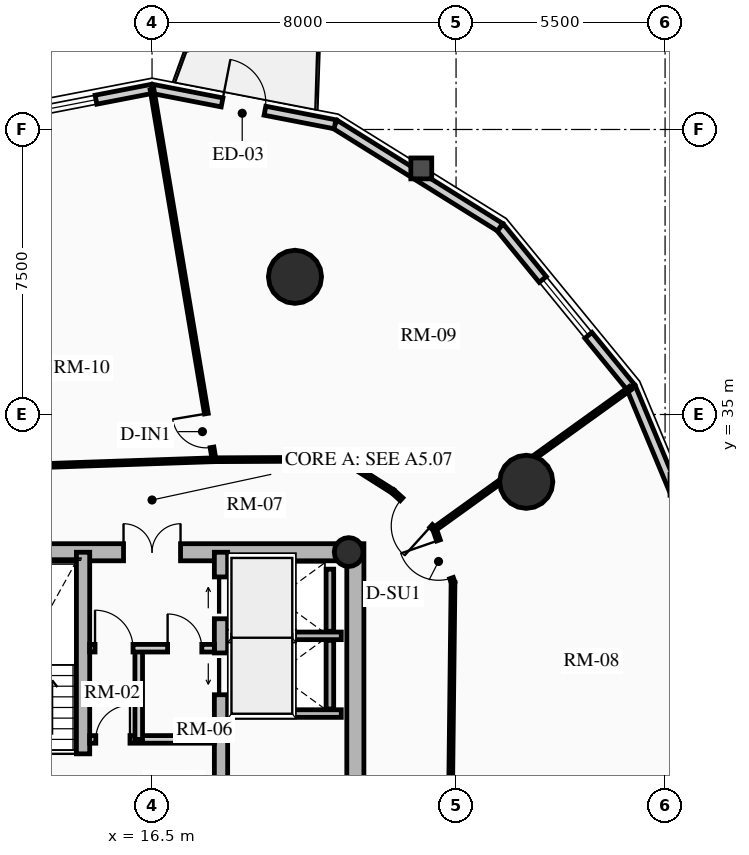
"""IFC4 building model, lengths in metres.
Left out: names, types, materials, properties, quantities, classifications, styles, units other than length and angle.
Written with IfcOpenShell. Run it as: python <this file> out.ifc"""

import sys

from ifc_helpers import new_model, si_unit, direction, frame, frame_2d, origin, origin_2d, place, context, subcontext, project, spatial, rectangle, circle, hollow_circle, extrude, source, transform, mapped, element, fill, save


model = new_model("IFC4")
c1 = context("Model", 3, precision=1e-05, world=origin(), true_north=direction((0.0, 1.0)))
c2 = subcontext(c1, "Body", "Model", "MODEL_VIEW")
j1 = project(units=[si_unit("LENGTHUNIT", "METRE"), si_unit("PLANEANGLEUNIT", "RADIAN")], contexts=[c1])
p1 = place(None, origin())
s1 = spatial("IfcSite", under=j1, at=p1, CompositionType="ELEMENT")
p2 = place(p1, origin())
s2 = spatial("IfcBuilding", under=s1, at=p2, CompositionType="ELEMENT")
p3 = place(p2, frame((0.0, 0.0, 96.34)))
s3 = spatial("IfcBuildingStorey", under=s2, at=p3, CompositionType="ELEMENT", Elevation=96.34)
p4 = place(p3, frame((21.85, 17.4, 0.0), z_axis=(0.0, 0.0, 1.0), x_axis=(0.0, 1.0, 0.0)))
e1 = element("IfcWall", 1, at=p4, inside=s3, PredefinedType="SHEAR", context=c2, shape_type="SweptSolid", body=[
    extrude(rectangle(XDim=14.2, YDim=0.45, at=frame_2d((7.1, 0.0))), origin(), (0.0, 0.0, 1.0), 2.91),
])
p5 = place(p3, frame((11.15, 31.375, 0.0), z_axis=(0.0, 0.0, 1.0), x_axis=(1.0, 0.0, 0.0)))
e2 = element("IfcWall", 2, at=p5, inside=s3, PredefinedType="SHEAR", context=c2, shape_type="SweptSolid", body=[
    extrude(rectangle(XDim=10.7, YDim=0.45, at=frame_2d((5.35, 0.0))), origin(), (0.0, 0.0, 1.0), 2.91),
])
m1 = source(origin(), c2, "Body", "SweptSolid", [
    extrude(rectangle(XDim=1.5, YDim=2.02, at=frame_2d((0.75, 1.01))), frame((0.0, 0.235, 0.0), z_axis=(0.0, -1.0, 0.0), x_axis=(1.0, 0.0, 0.0)), (0.0, 0.0, 1.0), 0.47),
])
p6 = place(p5, frame((4.6, 0.0, 0.0)))
e3 = element("IfcOpeningElement", 3, at=p6, cuts=e2, PredefinedType="OPENING", context=c2, shape_type="MappedRepresentation", body=[
    mapped(m1, transform((0.0, 0.0, 0.0), x_axis=(1.0, 0.0, 0.0), y_axis=(0.0, 1.0, 0.0), z_axis=(0.0, 0.0, 1.0), scale=1.0)),
])
p7 = place(p3, frame((14.685, 17.625, 0.0), z_axis=(0.0, 0.0, 1.0), x_axis=(0.0, 1.0, 0.0)))
e4 = element("IfcWall", 4, at=p7, inside=s3, PredefinedType="SHEAR", context=c2, shape_type="SweptSolid", body=[
    extrude(rectangle(XDim=13.75, YDim=0.35, at=frame_2d((6.875, 0.0))), origin(), (0.0, 0.0, 1.0), 2.91),
])
m2 = source(origin(), c2, "Body", "SweptSolid", [
    extrude(rectangle(XDim=1.1, YDim=2.015, at=frame_2d((0.55, 1.007))), frame((0.0, 0.185, 0.0), z_axis=(0.0, -1.0, 0.0), x_axis=(1.0, 0.0, 0.0)), (0.0, 0.0, 1.0), 0.37),
])
p8 = place(p7, frame((4.875, 0.0, 0.0)))
e5 = element("IfcOpeningElement", 5, at=p8, cuts=e4, PredefinedType="OPENING", context=c2, shape_type="MappedRepresentation", body=[
    mapped(m2, transform((0.0, 0.0, 0.0), x_axis=(1.0, 0.0, 0.0), y_axis=(0.0, 1.0, 0.0), z_axis=(0.0, 0.0, 1.0), scale=1.0)),
])
m3 = source(origin(), c2, "Body", "SweptSolid", [
    extrude(rectangle(XDim=1.15, YDim=2.02, at=frame_2d((0.575, 1.01))), frame((0.0, 0.185, 0.0), z_axis=(0.0, -1.0, 0.0), x_axis=(1.0, 0.0, 0.0)), (0.0, 0.0, 1.0), 0.37),
])
p9 = place(p7, frame((7.295, 0.0, 0.0)))
e6 = element("IfcOpeningElement", 6, at=p9, cuts=e4, PredefinedType="OPENING", context=c2, shape_type="MappedRepresentation", body=[
    mapped(m3, transform((0.0, 0.0, 0.0), x_axis=(1.0, 0.0, 0.0), y_axis=(0.0, 1.0, 0.0), z_axis=(0.0, 0.0, 1.0), scale=1.0)),
])
p10 = place(p3, frame((18.315, 17.625, 0.0), z_axis=(0.0, 0.0, 1.0), x_axis=(0.0, 1.0, 0.0)))
e7 = element("IfcWall", 7, at=p10, inside=s3, PredefinedType="SHEAR", context=c2, shape_type="SweptSolid", body=[
    extrude(rectangle(XDim=13.75, YDim=0.35, at=frame_2d((6.875, 0.0))), origin(), (0.0, 0.0, 1.0), 2.91),
])
p11 = place(p10, frame((10.0, 0.0, 0.0)))
e8 = element("IfcOpeningElement", 8, at=p11, cuts=e7, PredefinedType="OPENING", context=c2, shape_type="MappedRepresentation", body=[
    mapped(m2, transform((0.0, 0.0, 0.0), x_axis=(1.0, 0.0, 0.0), y_axis=(0.0, 1.0, 0.0), z_axis=(0.0, 0.0, 1.0), scale=1.0)),
])
p12 = place(p10, frame((12.0, 0.0, 0.0)))
e9 = element("IfcOpeningElement", 9, at=p12, cuts=e7, PredefinedType="OPENING", context=c2, shape_type="MappedRepresentation", body=[
    mapped(m2, transform((0.0, 0.0, 0.0), x_axis=(1.0, 0.0, 0.0), y_axis=(0.0, 1.0, 0.0), z_axis=(0.0, 0.0, 1.0), scale=1.0)),
])
p13 = place(p10, frame((5.305, 0.0, 0.0)))
e10 = element("IfcOpeningElement", 10, at=p13, cuts=e7, PredefinedType="OPENING", context=c2, shape_type="MappedRepresentation", body=[
    mapped(m3, transform((0.0, 0.0, 0.0), x_axis=(1.0, 0.0, 0.0), y_axis=(0.0, 1.0, 0.0), z_axis=(0.0, 0.0, 1.0), scale=1.0)),
])
p14 = place(p3, frame((21.675, 31.38, 0.0), z_axis=(0.0, 0.0, 1.0), x_axis=(1.0, 0.0, 0.0)))
e11 = element("IfcColumn", 11, at=p14, inside=s3, PredefinedType="COLUMN", context=c2, shape_type="SweptSolid", body=[
    extrude(hollow_circle(Radius=0.38, WallThickness=0.032, at=origin_2d()), origin(), (0.0, 0.0, 1.0), 2.91),
])
for number, where, z_axis, x_axis in (
    (12, (26.347, 33.229, 0.0), (0.0, 0.0, 1.0), (1.0, 0.0, 0.0)),
    (13, (20.261, 38.623, 0.0), (0.0, 0.0, 1.0), (1.0, 0.0, 0.0)),
):
    element("IfcColumn", number, at=place(p3, frame(where, z_axis=z_axis, x_axis=x_axis)), inside=s3, PredefinedType="USERDEFINED", context=c2, shape_type="SweptSolid", body=[
        extrude(circle(Radius=0.7, at=origin_2d()), origin(), (0.0, 0.0, 1.0), 2.91),
    ])
p15 = place(p3, frame((29.105, 35.709, 0.0), z_axis=(0.0, 0.0, 1.0), x_axis=(0.384344417632, -0.923189779317, 0.0)))
e14 = element("IfcWall", 14, at=p15, inside=s3, PredefinedType="SOLIDWALL", context=c2, shape_type="SweptSolid", body=[
    extrude(rectangle(XDim=5.758, YDim=0.24, at=frame_2d((2.879, 0.0))), origin(), (0.0, 0.0, 1.0), 2.179),
])
p16 = place(p3, frame((25.658, 39.928, 0.0), z_axis=(0.0, 0.0, 1.0), x_axis=(0.632700781152, -0.77439635945, 0.0)))
e15 = element("IfcWall", 15, at=p16, inside=s3, PredefinedType="SOLIDWALL", context=c2, shape_type="SweptSolid", body=[
    extrude(rectangle(XDim=5.448, YDim=0.24, at=frame_2d((2.724, 0.0))), origin(), (0.0, 0.0, 1.0), 2.179),
])
m4 = source(origin(), c2, "Body", "SweptSolid", [
    extrude(rectangle(XDim=1.9, YDim=1.35, at=frame_2d((0.95, 0.675))), frame((0.0, 0.13, 0.0), z_axis=(0.0, -1.0, 0.0), x_axis=(1.0, 0.0, 0.0)), (0.0, 0.0, 1.0), 0.26),
])
p17 = place(p16, frame((1.774, 0.0, 0.65)))
e16 = element("IfcOpeningElement", 16, at=p17, cuts=e15, PredefinedType="OPENING", context=c2, shape_type="MappedRepresentation", body=[
    mapped(m4, transform((0.0, 0.0, 0.0), x_axis=(1.0, 0.0, 0.0), y_axis=(0.0, 1.0, 0.0), z_axis=(0.0, 0.0, 1.0), scale=1.0)),
])
p18 = place(p3, frame((21.315, 42.637, 0.0), z_axis=(0.0, 0.0, 1.0), x_axis=(0.848520380187, -0.529162701263, 0.0)))
e17 = element("IfcWall", 17, at=p18, inside=s3, PredefinedType="SOLIDWALL", context=c2, shape_type="SweptSolid", body=[
    extrude(rectangle(XDim=5.119, YDim=0.24, at=frame_2d((2.56, 0.0))), origin(), (0.0, 0.0, 1.0), 2.179),
])
p19 = place(p3, frame((16.5, 43.57, 0.0), z_axis=(0.0, 0.0, 1.0), x_axis=(0.981723785992, -0.190311344954, 0.0)))
e18 = element("IfcWall", 18, at=p19, inside=s3, PredefinedType="SOLIDWALL", context=c2, shape_type="SweptSolid", body=[
    extrude(rectangle(XDim=4.904, YDim=0.24, at=frame_2d((2.452, 0.0))), origin(), (0.0, 0.0, 1.0), 2.179),
])
m5 = source(origin(), c2, "Body", "SweptSolid", [
    extrude(rectangle(XDim=1.15, YDim=2.005, at=frame_2d((0.575, 1.002))), frame((0.0, 0.13, 0.0), z_axis=(0.0, -1.0, 0.0), x_axis=(1.0, 0.0, 0.0)), (0.0, 0.0, 1.0), 0.26),
])
p20 = place(p19, frame((1.877, 0.0, 0.0)))
e19 = element("IfcOpeningElement", 19, at=p20, cuts=e18, PredefinedType="OPENING", context=c2, shape_type="MappedRepresentation", body=[
    mapped(m5, transform((0.0, 0.0, 0.0), x_axis=(1.0, 0.0, 0.0), y_axis=(0.0, 1.0, 0.0), z_axis=(0.0, 0.0, 1.0), scale=1.0)),
])
p21 = place(p3, frame((11.685, 42.637, 0.0), z_axis=(0.0, 0.0, 1.0), x_axis=(0.981723785992, 0.190311344954, 0.0)))
e20 = element("IfcWall", 20, at=p21, inside=s3, PredefinedType="SOLIDWALL", context=c2, shape_type="SweptSolid", body=[
    extrude(rectangle(XDim=4.904, YDim=0.24, at=frame_2d((2.452, 0.0))), origin(), (0.0, 0.0, 1.0), 2.179),
])
p22 = place(p21, frame((1.502, 0.0, 0.65)))
e21 = element("IfcOpeningElement", 21, at=p22, cuts=e20, PredefinedType="OPENING", context=c2, shape_type="MappedRepresentation", body=[
    mapped(m4, transform((0.0, 0.0, 0.0), x_axis=(1.0, 0.0, 0.0), y_axis=(0.0, 1.0, 0.0), z_axis=(0.0, 0.0, 1.0), scale=1.0)),
])
for number, where, z_axis, x_axis in (
    (22, (18.51, 27.13, 0.0), (0.0, 0.0, 1.0), (1.0, 0.0, 0.0)),
    (23, (18.51, 29.175, 0.0), (0.0, 0.0, 1.0), (1.0, 0.0, 0.0)),
):
    element("IfcWall", number, at=place(p3, frame(where, z_axis=z_axis, x_axis=x_axis)), inside=s3, PredefinedType="SHEAR", context=c2, shape_type="SweptSolid", body=[
        extrude(rectangle(XDim=2.97, YDim=0.2, at=frame_2d((1.485, 0.0))), origin(), (0.0, 0.0, 1.0), 2.91),
    ])
p23 = place(p3, frame((21.18, 27.25, 0.0), z_axis=(0.0, 0.0, 1.0), x_axis=(0.0, 1.0, 0.0)))
e24 = element("IfcWall", 24, at=p23, inside=s3, PredefinedType="SHEAR", context=c2, shape_type="SweptSolid", body=[
    extrude(rectangle(XDim=1.805, YDim=0.2, at=frame_2d((0.902, 0.0))), origin(), (0.0, 0.0, 1.0), 2.91),
])
p24 = place(p3, frame((21.18, 29.295, 0.0), z_axis=(0.0, 0.0, 1.0), x_axis=(0.0, 1.0, 0.0)))
e25 = element("IfcWall", 25, at=p24, inside=s3, PredefinedType="SHEAR", context=c2, shape_type="SweptSolid", body=[
    extrude(rectangle(XDim=1.635, YDim=0.2, at=frame_2d((0.817, 0.0))), origin(), (0.0, 0.0, 1.0), 2.91),
])
p25 = place(p3, frame((14.86, 26.45, 0.0), z_axis=(0.0, 0.0, 1.0), x_axis=(1.0, 0.0, 0.0)))
e26 = element("IfcWall", 26, at=p25, inside=s3, PredefinedType="PARTITIONING", context=c2, shape_type="SweptSolid", body=[
    extrude(rectangle(XDim=3.28, YDim=0.2, at=frame_2d((1.64, 0.0))), origin(), (0.0, 0.0, 1.0), 2.655),
])
m6 = source(origin(), c2, "Body", "SweptSolid", [
    extrude(rectangle(XDim=0.9, YDim=2.005, at=frame_2d((0.45, 1.002))), frame((0.0, 0.11, 0.0), z_axis=(0.0, -1.0, 0.0), x_axis=(1.0, 0.0, 0.0)), (0.0, 0.0, 1.0), 0.22),
])
p26 = place(p25, frame((0.16, 0.0, 0.0)))
e27 = element("IfcOpeningElement", 27, at=p26, cuts=e26, PredefinedType="OPENING", context=c2, shape_type="MappedRepresentation", body=[
    mapped(m6, transform((0.0, 0.0, 0.0), x_axis=(1.0, 0.0, 0.0), y_axis=(0.0, 1.0, 0.0), z_axis=(0.0, 0.0, 1.0), scale=1.0)),
])
p27 = place(p3, frame((16.15, 26.45, 0.0), z_axis=(0.0, 0.0, 1.0), x_axis=(0.0, 1.0, 0.0)))
e28 = element("IfcWall", 28, at=p27, inside=s3, PredefinedType="PARTITIONING", context=c2, shape_type="SweptSolid", body=[
    extrude(rectangle(XDim=2.4, YDim=0.2, at=frame_2d((1.2, 0.0))), origin(), (0.0, 0.0, 1.0), 2.655),
])
p28 = place(p3, frame((14.86, 28.85, 0.0), z_axis=(0.0, 0.0, 1.0), x_axis=(1.0, 0.0, 0.0)))
e29 = element("IfcWall", 29, at=p28, inside=s3, PredefinedType="PARTITIONING", context=c2, shape_type="SweptSolid", body=[
    extrude(rectangle(XDim=3.28, YDim=0.2, at=frame_2d((1.64, 0.0))), origin(), (0.0, 0.0, 1.0), 2.655),
])
m7 = source(origin(), c2, "Body", "SweptSolid", [
    extrude(rectangle(XDim=1.0, YDim=2.015, at=frame_2d((0.5, 1.007))), frame((0.0, 0.11, 0.0), z_axis=(0.0, -1.0, 0.0), x_axis=(1.0, 0.0, 0.0)), (0.0, 0.0, 1.0), 0.22),
])
p29 = place(p28, frame((0.14, 0.0, 0.0)))
e30 = element("IfcOpeningElement", 30, at=p29, cuts=e29, PredefinedType="OPENING", context=c2, shape_type="MappedRepresentation", body=[
    mapped(m7, transform((0.0, 0.0, 0.0), x_axis=(1.0, 0.0, 0.0), y_axis=(0.0, 1.0, 0.0), z_axis=(0.0, 0.0, 1.0), scale=1.0)),
])
p30 = place(p28, frame((2.05, 0.0, 0.0)))
e31 = element("IfcOpeningElement", 31, at=p30, cuts=e29, PredefinedType="OPENING", context=c2, shape_type="MappedRepresentation", body=[
    mapped(m6, transform((0.0, 0.0, 0.0), x_axis=(1.0, 0.0, 0.0), y_axis=(0.0, 1.0, 0.0), z_axis=(0.0, 0.0, 1.0), scale=1.0)),
])
p31 = place(p3, frame((24.35, 24.5, 0.0), z_axis=(0.0, 0.0, 1.0), x_axis=(0.011520250275, 0.999933639715, 0.0)))
e32 = element("IfcWall", 32, at=p31, inside=s3, PredefinedType="MOVABLE", context=c2, shape_type="SweptSolid", body=[
    extrude(rectangle(XDim=6.082, YDim=0.1, at=frame_2d((3.041, 0.0))), origin(), (0.0, 0.0, 1.0), 2.225),
])
p32 = place(p3, frame((24.42, 30.582, 0.0), z_axis=(0.0, 0.0, 1.0), x_axis=(-0.327437665675, 0.944872782494, 0.0)))
e33 = element("IfcWall", 33, at=p32, inside=s3, PredefinedType="MOVABLE", context=c2, shape_type="SweptSolid", body=[
    extrude(rectangle(XDim=1.487, YDim=0.1, at=frame_2d((0.743, 0.0))), origin(), (0.0, 0.0, 1.0), 2.225),
])
m8 = source(origin(), c2, "Body", "SweptSolid", [
    extrude(rectangle(XDim=1.05, YDim=2.015, at=frame_2d((0.525, 1.007))), frame((0.0, 0.06, 0.0), z_axis=(0.0, -1.0, 0.0), x_axis=(1.0, 0.0, 0.0)), (0.0, 0.0, 1.0), 0.12),
])
p33 = place(p32, frame((0.12, 0.0, 0.0)))
e34 = element("IfcOpeningElement", 34, at=p33, cuts=e33, PredefinedType="OPENING", context=c2, shape_type="MappedRepresentation", body=[
    mapped(m8, transform((0.0, 0.0, 0.0), x_axis=(1.0, 0.0, 0.0), y_axis=(0.0, 1.0, 0.0), z_axis=(0.0, 0.0, 1.0), scale=1.0)),
])
p34 = place(p3, frame((23.933, 31.987, 0.0), z_axis=(0.0, 0.0, 1.0), x_axis=(-0.742471347264, 0.669877823556, 0.0)))
e35 = element("IfcWall", 35, at=p34, inside=s3, PredefinedType="MOVABLE", context=c2, shape_type="SweptSolid", body=[
    extrude(rectangle(XDim=1.476, YDim=0.1, at=frame_2d((0.738, 0.0))), origin(), (0.0, 0.0, 1.0), 2.225),
])
p35 = place(p34, frame((0.12, 0.0, 0.0)))
e36 = element("IfcOpeningElement", 36, at=p35, cuts=e35, PredefinedType="OPENING", context=c2, shape_type="MappedRepresentation", body=[
    mapped(m8, transform((0.0, 0.0, 0.0), x_axis=(1.0, 0.0, 0.0), y_axis=(0.0, 1.0, 0.0), z_axis=(0.0, 0.0, 1.0), scale=1.0)),
])
p36 = place(p3, frame((22.837, 32.976, 0.0), z_axis=(0.0, 0.0, 1.0), x_axis=(-0.844976677144, 0.534803155454, 0.0)))
e37 = element("IfcWall", 37, at=p36, inside=s3, PredefinedType="MOVABLE", context=c2, shape_type="SweptSolid", body=[
    extrude(rectangle(XDim=1.587, YDim=0.1, at=frame_2d((0.793, 0.0))), origin(), (0.0, 0.0, 1.0), 2.225),
])
p37 = place(p3, frame((21.496, 33.824, 0.0), z_axis=(0.0, 0.0, 1.0), x_axis=(-0.999990516754, -0.004355043261, 0.0)))
e38 = element("IfcWall", 38, at=p37, inside=s3, PredefinedType="MOVABLE", context=c2, shape_type="SweptSolid", body=[
    extrude(rectangle(XDim=3.364, YDim=0.1, at=frame_2d((1.682, 0.0))), origin(), (0.0, 0.0, 1.0), 2.225),
])
p38 = place(p3, frame((18.133, 33.81, 0.0), z_axis=(0.0, 0.0, 1.0), x_axis=(-0.999415793323, -0.03417706916, 0.0)))
e39 = element("IfcWall", 39, at=p38, inside=s3, PredefinedType="MOVABLE", context=c2, shape_type="SweptSolid", body=[
    extrude(rectangle(XDim=6.486, YDim=0.1, at=frame_2d((3.243, 0.0))), origin(), (0.0, 0.0, 1.0), 2.225),
])
p39 = place(p3, frame((23.933, 31.987, 0.0), z_axis=(0.0, 0.0, 1.0), x_axis=(0.811642946178, 0.584153856377, 0.0)))
e40 = element("IfcWall", 40, at=p39, inside=s3, PredefinedType="MOVABLE", context=c2, shape_type="SweptSolid", body=[
    extrude(rectangle(XDim=6.352, YDim=0.1, at=frame_2d((3.176, 0.0))), origin(), (0.0, 0.0, 1.0), 2.179),
])
p40 = place(p3, frame((18.133, 33.81, 0.0), z_axis=(0.0, 0.0, 1.0), x_axis=(-0.165324898919, 0.98623915852, 0.0)))
e41 = element("IfcWall", 41, at=p40, inside=s3, PredefinedType="MOVABLE", context=c2, shape_type="SweptSolid", body=[
    extrude(rectangle(XDim=9.876, YDim=0.1, at=frame_2d((4.938, 0.0))), origin(), (0.0, 0.0, 1.0), 2.179),
])
m9 = source(origin(), c2, "Body", "SweptSolid", [
    extrude(rectangle(XDim=0.9, YDim=2.005, at=frame_2d((0.45, 1.002))), frame((0.0, 0.06, 0.0), z_axis=(0.0, -1.0, 0.0), x_axis=(1.0, 0.0, 0.0)), (0.0, 0.0, 1.0), 0.12),
])
p41 = place(p40, frame((0.33, 0.0, 0.0)))
e42 = element("IfcOpeningElement", 42, at=p41, cuts=e41, PredefinedType="OPENING", context=c2, shape_type="MappedRepresentation", body=[
    mapped(m9, transform((0.0, 0.0, 0.0), x_axis=(1.0, 0.0, 0.0), y_axis=(0.0, 1.0, 0.0), z_axis=(0.0, 0.0, 1.0), scale=1.0)),
])
m10 = source(origin(), c2, "Body", "SweptSolid", [
    extrude(rectangle(XDim=1.9, YDim=1.35, at=frame_2d((0.95, 0.675))), frame((0.0, 0.03, 0.0), z_axis=(0.0, -1.0, 0.0), x_axis=(1.0, 0.0, 0.0)), (0.0, 0.0, 1.0), 0.06),
])
p42 = place(p17, origin())
e43 = element("IfcWindow", 43, at=p42, inside=s3, PartitioningType="DOUBLE_PANEL_VERTICAL", PredefinedType="WINDOW", context=c2, shape_type="MappedRepresentation", body=[
    mapped(m10, transform((0.0, 0.0, 0.0), x_axis=(1.0, 0.0, 0.0), y_axis=(0.0, 1.0, 0.0), z_axis=(0.0, 0.0, 1.0), scale=1.0)),
])
fill(e16, e43)
m11 = source(origin(), c2, "Body", "SweptSolid", [
    extrude(rectangle(XDim=1.15, YDim=2.005, at=frame_2d((0.575, 1.002))), frame((0.0, 0.025, 0.0), z_axis=(0.0, -1.0, 0.0), x_axis=(1.0, 0.0, 0.0)), (0.0, 0.0, 1.0), 0.05),
])
p43 = place(p20, origin())
e44 = element("IfcDoor", 44, at=p43, inside=s3, OperationType="SINGLE_SWING_LEFT", PredefinedType="DOOR", context=c2, shape_type="MappedRepresentation", body=[
    mapped(m11, transform((0.0, 0.0, 0.0), x_axis=(1.0, 0.0, 0.0), y_axis=(0.0, 1.0, 0.0), z_axis=(0.0, 0.0, 1.0), scale=1.0)),
])
fill(e19, e44)
p44 = place(p22, origin())
e45 = element("IfcWindow", 45, at=p44, inside=s3, PartitioningType="DOUBLE_PANEL_VERTICAL", PredefinedType="WINDOW", context=c2, shape_type="MappedRepresentation", body=[
    mapped(m10, transform((0.0, 0.0, 0.0), x_axis=(1.0, 0.0, 0.0), y_axis=(0.0, 1.0, 0.0), z_axis=(0.0, 0.0, 1.0), scale=1.0)),
])
fill(e21, e45)
m12 = source(origin(), c2, "Body", "SweptSolid", [
    extrude(rectangle(XDim=1.1, YDim=2.015, at=frame_2d((0.55, 1.007))), frame((0.0, 0.025, 0.0), z_axis=(0.0, -1.0, 0.0), x_axis=(1.0, 0.0, 0.0)), (0.0, 0.0, 1.0), 0.05),
])
p45 = place(p11, origin())
e46 = element("IfcDoor", 46, at=p45, inside=s3, OperationType="SLIDING_TO_LEFT", PredefinedType="DOOR", context=c2, shape_type="MappedRepresentation", body=[
    mapped(m12, transform((0.0, 0.0, 0.0), x_axis=(1.0, 0.0, 0.0), y_axis=(0.0, 1.0, 0.0), z_axis=(0.0, 0.0, 1.0), scale=1.0)),
])
fill(e8, e46)
p46 = place(p12, origin())
e47 = element("IfcDoor", 47, at=p46, inside=s3, OperationType="SLIDING_TO_RIGHT", PredefinedType="DOOR", context=c2, shape_type="MappedRepresentation", body=[
    mapped(m12, transform((0.0, 0.0, 0.0), x_axis=(1.0, 0.0, 0.0), y_axis=(0.0, 1.0, 0.0), z_axis=(0.0, 0.0, 1.0), scale=1.0)),
])
fill(e9, e47)
m13 = source(origin(), c2, "Body", "SweptSolid", [
    extrude(rectangle(XDim=1.15, YDim=2.02, at=frame_2d((0.575, 1.01))), frame((0.0, 0.025, 0.0), z_axis=(0.0, -1.0, 0.0), x_axis=(1.0, 0.0, 0.0)), (0.0, 0.0, 1.0), 0.05),
])
p47 = place(p9, origin())
e48 = element("IfcDoor", 48, at=p47, inside=s3, OperationType="SINGLE_SWING_RIGHT", PredefinedType="DOOR", context=c2, shape_type="MappedRepresentation", body=[
    mapped(m13, transform((0.0, 0.0, 0.0), x_axis=(1.0, 0.0, 0.0), y_axis=(0.0, 1.0, 0.0), z_axis=(0.0, 0.0, 1.0), scale=1.0)),
])
fill(e6, e48)
m14 = source(origin(), c2, "Body", "SweptSolid", [
    extrude(rectangle(XDim=1.5, YDim=2.02, at=frame_2d((0.75, 1.01))), frame((0.0, 0.025, 0.0), z_axis=(0.0, -1.0, 0.0), x_axis=(1.0, 0.0, 0.0)), (0.0, 0.0, 1.0), 0.05),
])
p48 = place(p6, origin())
e49 = element("IfcDoor", 49, at=p48, inside=s3, OperationType="DOUBLE_DOOR_SINGLE_SWING", PredefinedType="DOOR", context=c2, shape_type="MappedRepresentation", body=[
    mapped(m14, transform((0.0, 0.0, 0.0), x_axis=(1.0, 0.0, 0.0), y_axis=(0.0, 1.0, 0.0), z_axis=(0.0, 0.0, 1.0), scale=1.0)),
])
fill(e3, e49)
m15 = source(origin(), c2, "Body", "SweptSolid", [
    extrude(rectangle(XDim=0.9, YDim=2.005, at=frame_2d((0.45, 1.002))), frame((0.0, 0.025, 0.0), z_axis=(0.0, -1.0, 0.0), x_axis=(1.0, 0.0, 0.0)), (0.0, 0.0, 1.0), 0.05),
])
p49 = place(p26, origin())
e50 = element("IfcDoor", 50, at=p49, inside=s3, OperationType="SINGLE_SWING_RIGHT", PredefinedType="DOOR", context=c2, shape_type="MappedRepresentation", body=[
    mapped(m15, transform((0.0, 0.0, 0.0), x_axis=(1.0, 0.0, 0.0), y_axis=(0.0, 1.0, 0.0), z_axis=(0.0, 0.0, 1.0), scale=1.0)),
])
fill(e27, e50)
m16 = source(origin(), c2, "Body", "SweptSolid", [
    extrude(rectangle(XDim=1.0, YDim=2.015, at=frame_2d((0.5, 1.007))), frame((0.0, 0.025, 0.0), z_axis=(0.0, -1.0, 0.0), x_axis=(1.0, 0.0, 0.0)), (0.0, 0.0, 1.0), 0.05),
])
p50 = place(p29, origin())
e51 = element("IfcDoor", 51, at=p50, inside=s3, OperationType="SINGLE_SWING_LEFT", PredefinedType="DOOR", context=c2, shape_type="MappedRepresentation", body=[
    mapped(m16, transform((0.0, 0.0, 0.0), x_axis=(1.0, 0.0, 0.0), y_axis=(0.0, 1.0, 0.0), z_axis=(0.0, 0.0, 1.0), scale=1.0)),
])
fill(e30, e51)
p51 = place(p30, origin())
e52 = element("IfcDoor", 52, at=p51, inside=s3, OperationType="SINGLE_SWING_LEFT", PredefinedType="DOOR", context=c2, shape_type="MappedRepresentation", body=[
    mapped(m15, transform((0.0, 0.0, 0.0), x_axis=(1.0, 0.0, 0.0), y_axis=(0.0, 1.0, 0.0), z_axis=(0.0, 0.0, 1.0), scale=1.0)),
])
fill(e31, e52)
m17 = source(origin(), c2, "Body", "SweptSolid", [
    extrude(rectangle(XDim=1.05, YDim=2.015, at=frame_2d((0.525, 1.007))), frame((0.0, 0.025, 0.0), z_axis=(0.0, -1.0, 0.0), x_axis=(1.0, 0.0, 0.0)), (0.0, 0.0, 1.0), 0.05),
])
p52 = place(p33, origin())
e53 = element("IfcDoor", 53, at=p52, inside=s3, OperationType="SINGLE_SWING_RIGHT", PredefinedType="DOOR", context=c2, shape_type="MappedRepresentation", body=[
    mapped(m17, transform((0.0, 0.0, 0.0), x_axis=(1.0, 0.0, 0.0), y_axis=(0.0, 1.0, 0.0), z_axis=(0.0, 0.0, 1.0), scale=1.0)),
])
fill(e34, e53)
p53 = place(p35, origin())
e54 = element("IfcDoor", 54, at=p53, inside=s3, OperationType="SINGLE_SWING_LEFT", PredefinedType="DOOR", context=c2, shape_type="MappedRepresentation", body=[
    mapped(m17, transform((0.0, 0.0, 0.0), x_axis=(1.0, 0.0, 0.0), y_axis=(0.0, 1.0, 0.0), z_axis=(0.0, 0.0, 1.0), scale=1.0)),
])
fill(e36, e54)
p54 = place(p41, origin())
e55 = element("IfcDoor", 55, at=p54, inside=s3, OperationType="SINGLE_SWING_RIGHT", PredefinedType="DOOR", context=c2, shape_type="MappedRepresentation", body=[
    mapped(m15, transform((0.0, 0.0, 0.0), x_axis=(1.0, 0.0, 0.0), y_axis=(0.0, 1.0, 0.0), z_axis=(0.0, 0.0, 1.0), scale=1.0)),
])
fill(e42, e55)
save(model, sys.argv[1])
